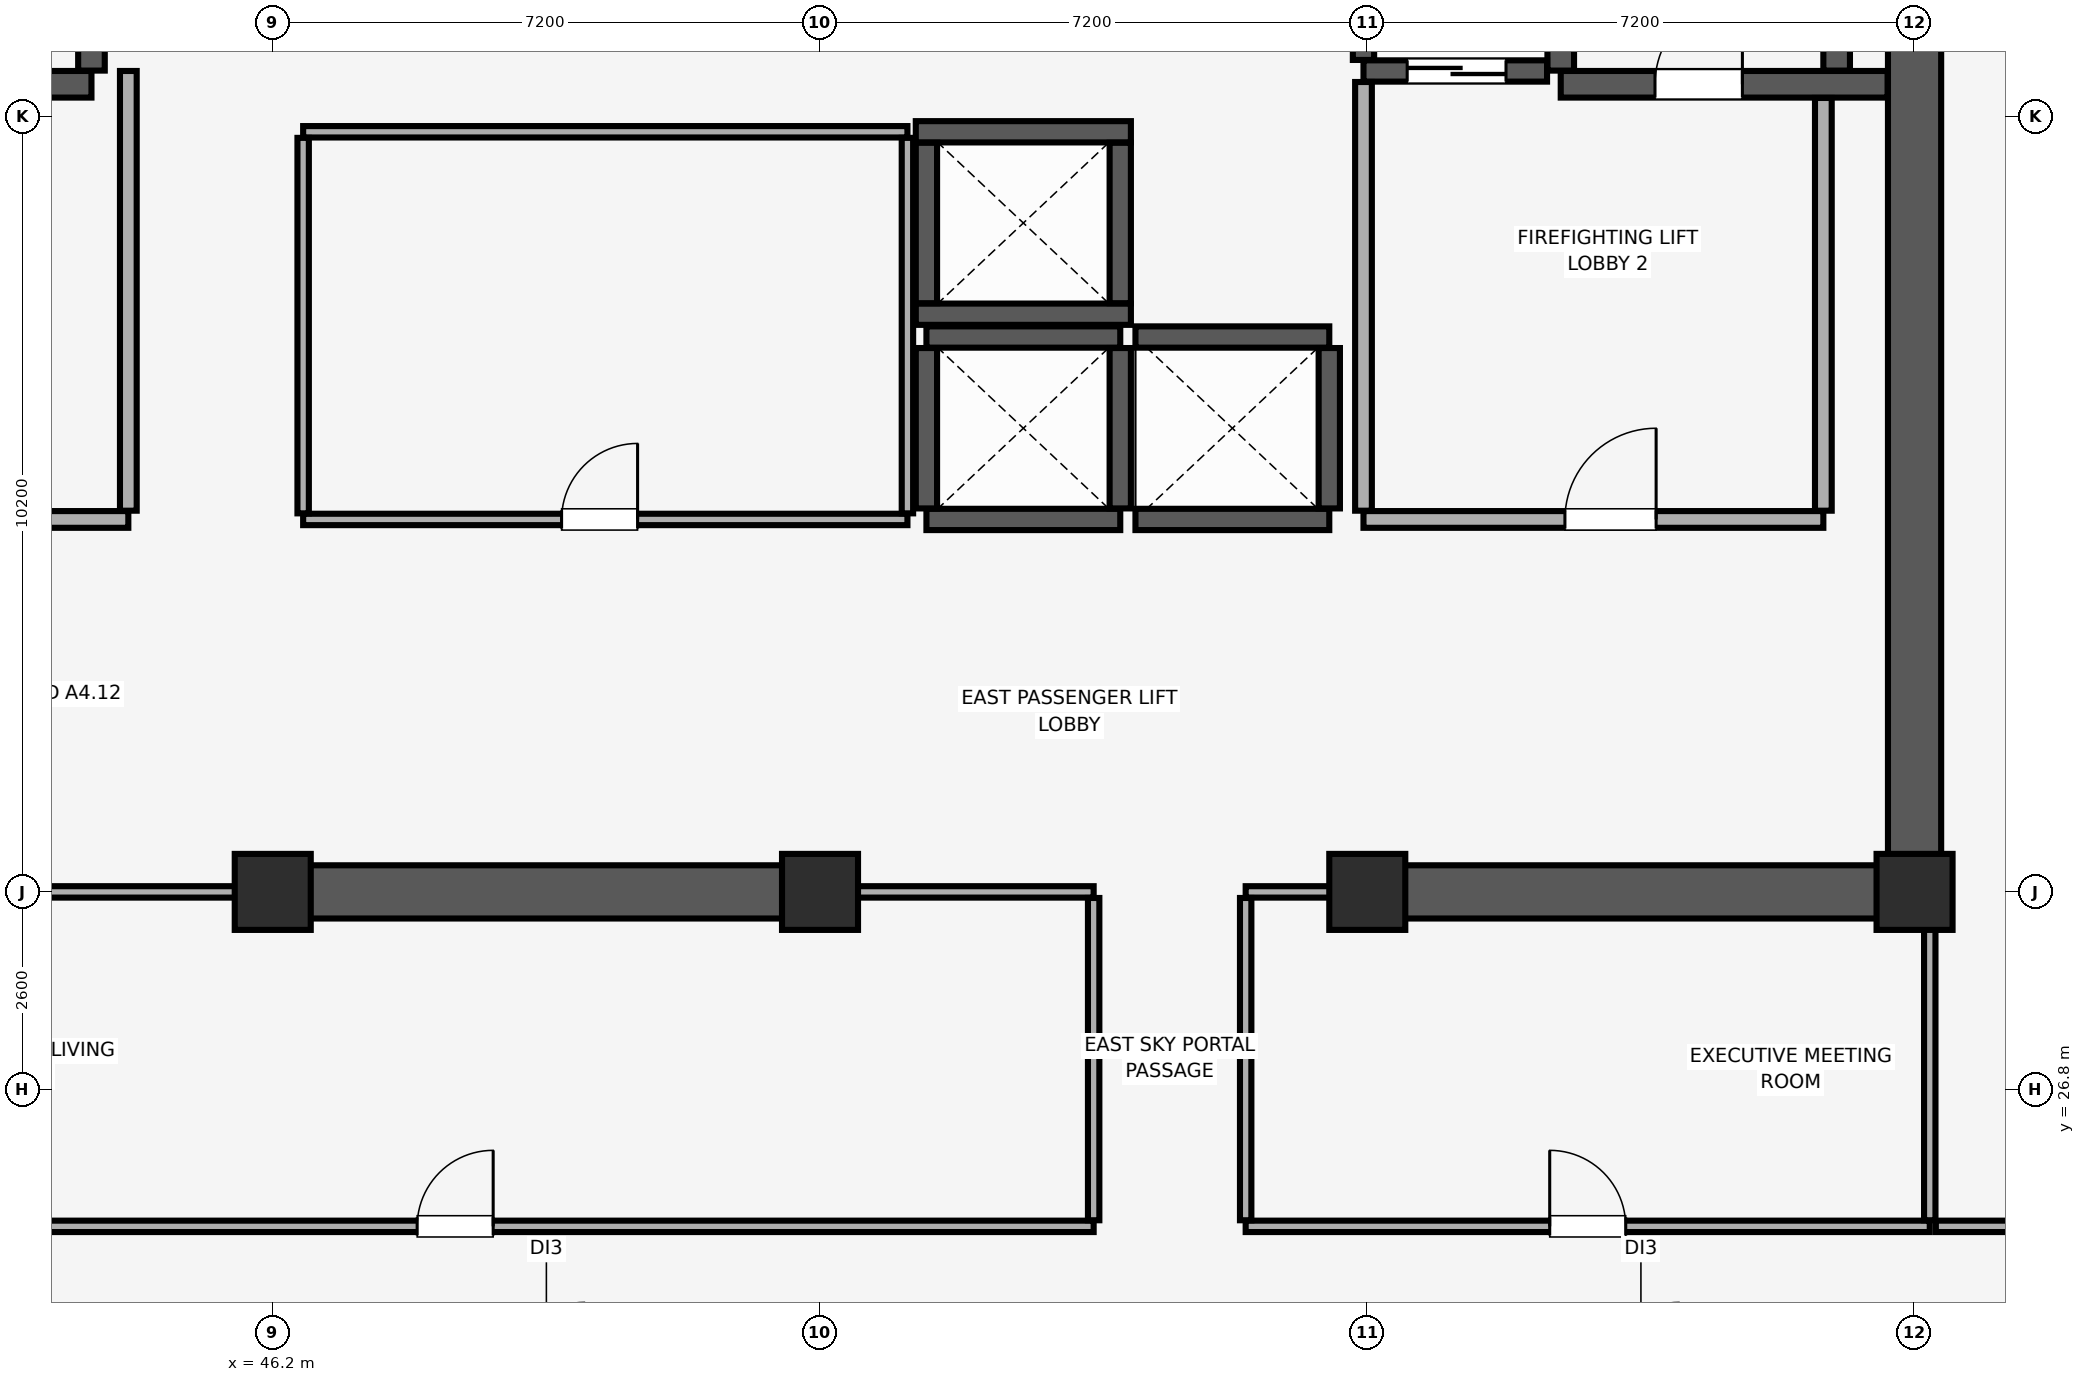
"""IFC4 building model, lengths in metres.
Left out: names, types, materials, properties, quantities, classifications, styles, units other than length and angle.
Written with IfcOpenShell. Run it as: python <this file> out.ifc"""

import sys

from ifc_helpers import new_model, si_unit, direction, frame, frame_2d, origin, origin_2d, place, context, subcontext, project, spatial, rectangle, extrude, element, fill, save


model = new_model("IFC4")
c1 = context("Model", 3, precision=1e-05, world=origin(), true_north=direction((0.0, 1.0)))
c2 = subcontext(c1, "Body", "Model", "MODEL_VIEW")
j1 = project(units=[si_unit("LENGTHUNIT", "METRE"), si_unit("PLANEANGLEUNIT", "RADIAN")], contexts=[c1])
p1 = place(None, origin())
s1 = spatial("IfcSite", under=j1, at=p1, CompositionType="ELEMENT")
p2 = place(p1, origin())
s2 = spatial("IfcBuilding", under=s1, at=p2, CompositionType="ELEMENT")
p3 = place(p2, frame((0.0, 0.0, 276.55)))
s3 = spatial("IfcBuildingStorey", under=s2, at=p3, CompositionType="ELEMENT", Elevation=276.55)
for number, where, z_axis, x_axis in (
    (1, (46.2, 29.4, 0.0), (0.0, 0.0, 1.0), (1.0, 0.0, 0.0)),
    (2, (53.4, 29.4, 0.0), (0.0, 0.0, 1.0), (1.0, 0.0, 0.0)),
    (3, (60.6, 29.4, 0.0), (0.0, 0.0, 1.0), (1.0, 0.0, 0.0)),
    (4, (67.8, 29.4, 0.0), (0.0, 0.0, 1.0), (1.0, 0.0, 0.0)),
):
    element("IfcColumn", number, at=place(p3, frame(where, z_axis=z_axis, x_axis=x_axis)), inside=s3, PredefinedType="COLUMN", context=c2, shape_type="SweptSolid", body=[
        extrude(rectangle(XDim=1.0, YDim=1.0, at=origin_2d()), origin(), (0.0, 0.0, 1.0), 3.6),
    ])
p4 = place(p3, frame((67.8, 29.4, 0.0), z_axis=(0.0, 0.0, 1.0), x_axis=(0.0, 1.0, 0.0)))
e5 = element("IfcWall", 5, at=p4, inside=s3, PredefinedType="SHEAR", context=c2, shape_type="SweptSolid", body=[
    extrude(rectangle(XDim=19.2, YDim=0.7, at=frame_2d((9.6, 0.0))), origin(), (0.0, 0.0, 1.0), 3.6),
])
p5 = place(p3, frame((46.0, 29.4, 0.0), z_axis=(0.0, 0.0, 1.0), x_axis=(1.0, 0.0, 0.0)))
e6 = element("IfcWall", 6, at=p5, inside=s3, PredefinedType="SHEAR", context=c2, shape_type="SweptSolid", body=[
    extrude(rectangle(XDim=7.6, YDim=0.7, at=frame_2d((3.8, 0.0))), origin(), (0.0, 0.0, 1.0), 3.6),
])
p6 = place(p3, frame((60.4, 29.4, 0.0), z_axis=(0.0, 0.0, 1.0), x_axis=(1.0, 0.0, 0.0)))
e7 = element("IfcWall", 7, at=p6, inside=s3, PredefinedType="SHEAR", context=c2, shape_type="SweptSolid", body=[
    extrude(rectangle(XDim=7.045, YDim=0.7, at=frame_2d((3.522, 0.0))), origin(), (0.0, 0.0, 1.0), 3.6),
])
p7 = place(p3, frame((40.185, 40.025, 0.0), z_axis=(0.0, 0.0, 1.0), x_axis=(1.0, 0.0, 0.0)))
e8 = element("IfcWall", 8, at=p7, inside=s3, PredefinedType="SHEAR", context=c2, shape_type="SweptSolid", body=[
    extrude(rectangle(XDim=3.63, YDim=0.35, at=frame_2d((1.815, 0.0))), origin(), (0.0, 0.0, 1.0), 3.6),
])
p8 = place(p7, frame((1.24, 0.0, 0.0)))
e9 = element("IfcOpeningElement", 9, at=p8, cuts=e8, PredefinedType="OPENING", context=c2, shape_type="SweptSolid", body=[
    extrude(rectangle(XDim=1.15, YDim=2.15, at=frame_2d((0.575, 1.075))), frame((0.0, 0.185, 0.0), z_axis=(0.0, -1.0, 0.0), x_axis=(1.0, 0.0, 0.0)), (0.0, 0.0, 1.0), 0.37),
])
p9 = place(p3, frame((43.815, 40.205, 0.0), z_axis=(0.0, 0.0, 1.0), x_axis=(0.0, 1.0, 0.0)))
e10 = element("IfcWall", 10, at=p9, inside=s3, PredefinedType="SHEAR", context=c2, shape_type="SweptSolid", body=[
    extrude(rectangle(XDim=8.09, YDim=0.35, at=frame_2d((4.045, 0.0))), origin(), (0.0, 0.0, 1.0), 3.6),
])
p10 = place(p3, frame((63.145, 40.025, 0.0), z_axis=(0.0, 0.0, 1.0), x_axis=(1.0, 0.0, 0.0)))
e11 = element("IfcWall", 11, at=p10, inside=s3, PredefinedType="SHEAR", context=c2, shape_type="SweptSolid", body=[
    extrude(rectangle(XDim=4.3, YDim=0.35, at=frame_2d((2.15, 0.0))), origin(), (0.0, 0.0, 1.0), 3.6),
])
p11 = place(p10, frame((1.24, 0.0, 0.0)))
e12 = element("IfcOpeningElement", 12, at=p11, cuts=e11, PredefinedType="OPENING", context=c2, shape_type="SweptSolid", body=[
    extrude(rectangle(XDim=1.15, YDim=2.15, at=frame_2d((0.575, 1.075))), frame((0.0, 0.185, 0.0), z_axis=(0.0, -1.0, 0.0), x_axis=(1.0, 0.0, 0.0)), (0.0, 0.0, 1.0), 0.37),
])
for number, where, z_axis, x_axis in (
    (13, (63.145, 40.205, 0.0), (0.0, 0.0, 1.0), (0.0, 1.0, 0.0)),
    (14, (66.775, 40.205, 0.0), (0.0, 0.0, 1.0), (0.0, 1.0, 0.0)),
):
    element("IfcWall", number, at=place(p3, frame(where, z_axis=z_axis, x_axis=x_axis)), inside=s3, PredefinedType="SHEAR", context=c2, shape_type="SweptSolid", body=[
        extrude(rectangle(XDim=8.09, YDim=0.35, at=frame_2d((4.045, 0.0))), origin(), (0.0, 0.0, 1.0), 3.6),
    ])
for number, where, z_axis, x_axis in (
    (15, (54.8, 34.3, 0.0), (0.0, 0.0, 1.0), (1.0, 0.0, 0.0)),
    (16, (54.8, 36.7, 0.0), (0.0, 0.0, 1.0), (1.0, 0.0, 0.0)),
):
    element("IfcWall", number, at=place(p3, frame(where, z_axis=z_axis, x_axis=x_axis)), inside=s3, PredefinedType="SHEAR", context=c2, shape_type="SweptSolid", body=[
        extrude(rectangle(XDim=2.55, YDim=0.28, at=frame_2d((1.275, 0.0))), origin(), (0.0, 0.0, 1.0), 3.6),
    ])
for number, where, z_axis, x_axis in (
    (17, (54.8, 34.445, 0.0), (0.0, 0.0, 1.0), (0.0, 1.0, 0.0)),
    (18, (57.35, 34.445, 0.0), (0.0, 0.0, 1.0), (0.0, 1.0, 0.0)),
):
    element("IfcWall", number, at=place(p3, frame(where, z_axis=z_axis, x_axis=x_axis)), inside=s3, PredefinedType="SHEAR", context=c2, shape_type="SweptSolid", body=[
        extrude(rectangle(XDim=2.11, YDim=0.28, at=frame_2d((1.055, 0.0))), origin(), (0.0, 0.0, 1.0), 3.6),
    ])
for number, where, z_axis, x_axis in (
    (19, (57.55, 34.3, 0.0), (0.0, 0.0, 1.0), (1.0, 0.0, 0.0)),
    (20, (57.55, 36.7, 0.0), (0.0, 0.0, 1.0), (1.0, 0.0, 0.0)),
):
    element("IfcWall", number, at=place(p3, frame(where, z_axis=z_axis, x_axis=x_axis)), inside=s3, PredefinedType="SHEAR", context=c2, shape_type="SweptSolid", body=[
        extrude(rectangle(XDim=2.55, YDim=0.28, at=frame_2d((1.275, 0.0))), origin(), (0.0, 0.0, 1.0), 3.6),
    ])
p12 = place(p3, frame((60.1, 34.445, 0.0), z_axis=(0.0, 0.0, 1.0), x_axis=(0.0, 1.0, 0.0)))
e21 = element("IfcWall", 21, at=p12, inside=s3, PredefinedType="SHEAR", context=c2, shape_type="SweptSolid", body=[
    extrude(rectangle(XDim=2.11, YDim=0.28, at=frame_2d((1.055, 0.0))), origin(), (0.0, 0.0, 1.0), 3.6),
])
for number, where, z_axis, x_axis in (
    (22, (54.66, 37.0, 0.0), (0.0, 0.0, 1.0), (1.0, 0.0, 0.0)),
    (23, (54.66, 39.4, 0.0), (0.0, 0.0, 1.0), (1.0, 0.0, 0.0)),
):
    element("IfcWall", number, at=place(p3, frame(where, z_axis=z_axis, x_axis=x_axis)), inside=s3, PredefinedType="SHEAR", context=c2, shape_type="SweptSolid", body=[
        extrude(rectangle(XDim=2.83, YDim=0.28, at=frame_2d((1.415, 0.0))), origin(), (0.0, 0.0, 1.0), 3.6),
    ])
for number, where, z_axis, x_axis in (
    (24, (54.8, 37.145, 0.0), (0.0, 0.0, 1.0), (0.0, 1.0, 0.0)),
    (25, (57.35, 37.145, 0.0), (0.0, 0.0, 1.0), (0.0, 1.0, 0.0)),
):
    element("IfcWall", number, at=place(p3, frame(where, z_axis=z_axis, x_axis=x_axis)), inside=s3, PredefinedType="SHEAR", context=c2, shape_type="SweptSolid", body=[
        extrude(rectangle(XDim=2.11, YDim=0.28, at=frame_2d((1.055, 0.0))), origin(), (0.0, 0.0, 1.0), 3.6),
    ])
p13 = place(p3, frame((60.55, 40.2, 0.0), z_axis=(0.0, 0.0, 1.0), x_axis=(1.0, 0.0, 0.0)))
e26 = element("IfcWall", 26, at=p13, inside=s3, PredefinedType="SHEAR", context=c2, shape_type="SweptSolid", body=[
    extrude(rectangle(XDim=2.415, YDim=0.28, at=frame_2d((1.208, 0.0))), origin(), (0.0, 0.0, 1.0), 3.6),
])
p14 = place(p13, frame((0.575, 0.0, 0.0)))
e27 = element("IfcOpeningElement", 27, at=p14, cuts=e26, PredefinedType="OPENING", context=c2, shape_type="SweptSolid", body=[
    extrude(rectangle(XDim=1.3, YDim=2.3, at=frame_2d((0.65, 1.15))), frame((0.0, 0.15, 0.0), z_axis=(0.0, -1.0, 0.0), x_axis=(1.0, 0.0, 0.0)), (0.0, 0.0, 1.0), 0.3),
])
p15 = place(p3, frame((60.55, 40.345, 0.0), z_axis=(0.0, 0.0, 1.0), x_axis=(0.0, 1.0, 0.0)))
e28 = element("IfcWall", 28, at=p15, inside=s3, PredefinedType="SHEAR", context=c2, shape_type="SweptSolid", body=[
    extrude(rectangle(XDim=2.81, YDim=0.28, at=frame_2d((1.405, 0.0))), origin(), (0.0, 0.0, 1.0), 3.6),
])
p16 = place(p3, frame((60.55, 34.3, 0.0), z_axis=(0.0, 0.0, 1.0), x_axis=(1.0, 0.0, 0.0)))
e29 = element("IfcWall", 29, at=p16, inside=s3, PredefinedType="PARTITIONING", context=c2, shape_type="SweptSolid", body=[
    extrude(rectangle(XDim=6.05, YDim=0.22, at=frame_2d((3.025, 0.0))), origin(), (0.0, 0.0, 1.0), 3.6),
])
p17 = place(p16, frame((2.65, 0.0, 0.0)))
e30 = element("IfcOpeningElement", 30, at=p17, cuts=e29, PredefinedType="OPENING", context=c2, shape_type="SweptSolid", body=[
    extrude(rectangle(XDim=1.2, YDim=2.15, at=frame_2d((0.6, 1.075))), frame((0.0, 0.12, 0.0), z_axis=(0.0, -1.0, 0.0), x_axis=(1.0, 0.0, 0.0)), (0.0, 0.0, 1.0), 0.24),
])
p18 = place(p3, frame((60.55, 34.415, 0.0), z_axis=(0.0, 0.0, 1.0), x_axis=(0.0, 1.0, 0.0)))
e31 = element("IfcWall", 31, at=p18, inside=s3, PredefinedType="PARTITIONING", context=c2, shape_type="SweptSolid", body=[
    extrude(rectangle(XDim=5.64, YDim=0.22, at=frame_2d((2.82, 0.0))), origin(), (0.0, 0.0, 1.0), 3.6),
])
p19 = place(p3, frame((66.6, 34.415, 0.0), z_axis=(0.0, 0.0, 1.0), x_axis=(0.0, 1.0, 0.0)))
e32 = element("IfcWall", 32, at=p19, inside=s3, PredefinedType="PARTITIONING", context=c2, shape_type="SweptSolid", body=[
    extrude(rectangle(XDim=5.43, YDim=0.22, at=frame_2d((2.715, 0.0))), origin(), (0.0, 0.0, 1.0), 3.6),
])
p20 = place(p3, frame((39.7, 34.3, 0.0), z_axis=(0.0, 0.0, 1.0), x_axis=(1.0, 0.0, 0.0)))
e33 = element("IfcWall", 33, at=p20, inside=s3, PredefinedType="PARTITIONING", context=c2, shape_type="SweptSolid", body=[
    extrude(rectangle(XDim=4.6, YDim=0.22, at=frame_2d((2.3, 0.0))), origin(), (0.0, 0.0, 1.0), 3.6),
])
p21 = place(p20, frame((1.7, 0.0, 0.0)))
e34 = element("IfcOpeningElement", 34, at=p21, cuts=e33, PredefinedType="OPENING", context=c2, shape_type="SweptSolid", body=[
    extrude(rectangle(XDim=1.2, YDim=2.15, at=frame_2d((0.6, 1.075))), frame((0.0, 0.12, 0.0), z_axis=(0.0, -1.0, 0.0), x_axis=(1.0, 0.0, 0.0)), (0.0, 0.0, 1.0), 0.24),
])
p22 = place(p3, frame((44.3, 34.415, 0.0), z_axis=(0.0, 0.0, 1.0), x_axis=(0.0, 1.0, 0.0)))
e35 = element("IfcWall", 35, at=p22, inside=s3, PredefinedType="PARTITIONING", context=c2, shape_type="SweptSolid", body=[
    extrude(rectangle(XDim=5.785, YDim=0.22, at=frame_2d((2.893, 0.0))), origin(), (0.0, 0.0, 1.0), 3.6),
])
p23 = place(p3, frame((46.6, 34.3, 0.0), z_axis=(0.0, 0.0, 1.0), x_axis=(1.0, 0.0, 0.0)))
e36 = element("IfcWall", 36, at=p23, inside=s3, PredefinedType="PARTITIONING", context=c2, shape_type="SweptSolid", body=[
    extrude(rectangle(XDim=7.95, YDim=0.15, at=frame_2d((3.975, 0.0))), origin(), (0.0, 0.0, 1.0), 3.6),
])
p24 = place(p23, frame((3.4, 0.0, 0.0)))
e37 = element("IfcOpeningElement", 37, at=p24, cuts=e36, PredefinedType="OPENING", context=c2, shape_type="SweptSolid", body=[
    extrude(rectangle(XDim=1.0, YDim=2.15, at=frame_2d((0.5, 1.075))), frame((0.0, 0.085, 0.0), z_axis=(0.0, -1.0, 0.0), x_axis=(1.0, 0.0, 0.0)), (0.0, 0.0, 1.0), 0.17),
])
p25 = place(p3, frame((46.6, 39.4, 0.0), z_axis=(0.0, 0.0, 1.0), x_axis=(1.0, 0.0, 0.0)))
e38 = element("IfcWall", 38, at=p25, inside=s3, PredefinedType="PARTITIONING", context=c2, shape_type="SweptSolid", body=[
    extrude(rectangle(XDim=7.95, YDim=0.15, at=frame_2d((3.975, 0.0))), origin(), (0.0, 0.0, 1.0), 3.6),
])
for number, where, z_axis, x_axis in (
    (39, (46.6, 34.38, 0.0), (0.0, 0.0, 1.0), (0.0, 1.0, 0.0)),
    (40, (54.55, 34.38, 0.0), (0.0, 0.0, 1.0), (0.0, 1.0, 0.0)),
):
    element("IfcWall", number, at=place(p3, frame(where, z_axis=z_axis, x_axis=x_axis)), inside=s3, PredefinedType="PARTITIONING", context=c2, shape_type="SweptSolid", body=[
        extrude(rectangle(XDim=4.94, YDim=0.15, at=frame_2d((2.47, 0.0))), origin(), (0.0, 0.0, 1.0), 3.6),
    ])
p26 = place(p3, frame((40.28, 25.0, 0.0), z_axis=(0.0, 0.0, 1.0), x_axis=(1.0, 0.0, 0.0)))
e41 = element("IfcWall", 41, at=p26, inside=s3, PredefinedType="PARTITIONING", context=c2, shape_type="SweptSolid", body=[
    extrude(rectangle(XDim=16.72, YDim=0.15, at=frame_2d((8.36, 0.0))), origin(), (0.0, 0.0, 1.0), 3.6),
])
p27 = place(p26, frame((7.82, 0.0, 0.0)))
e42 = element("IfcOpeningElement", 42, at=p27, cuts=e41, PredefinedType="OPENING", context=c2, shape_type="SweptSolid", body=[
    extrude(rectangle(XDim=1.0, YDim=2.15, at=frame_2d((0.5, 1.075))), frame((0.0, 0.085, 0.0), z_axis=(0.0, -1.0, 0.0), x_axis=(1.0, 0.0, 0.0)), (0.0, 0.0, 1.0), 0.17),
])
p28 = place(p3, frame((40.28, 29.4, 0.0), z_axis=(0.0, 0.0, 1.0), x_axis=(1.0, 0.0, 0.0)))
e43 = element("IfcWall", 43, at=p28, inside=s3, PredefinedType="PARTITIONING", context=c2, shape_type="SweptSolid", body=[
    extrude(rectangle(XDim=5.71, YDim=0.15, at=frame_2d((2.855, 0.0))), origin(), (0.0, 0.0, 1.0), 2.5),
])
p29 = place(p3, frame((53.61, 29.4, 0.0), z_axis=(0.0, 0.0, 1.0), x_axis=(1.0, 0.0, 0.0)))
e44 = element("IfcWall", 44, at=p29, inside=s3, PredefinedType="PARTITIONING", context=c2, shape_type="SweptSolid", body=[
    extrude(rectangle(XDim=3.39, YDim=0.15, at=frame_2d((1.695, 0.0))), origin(), (0.0, 0.0, 1.0), 2.5),
])
p30 = place(p3, frame((57.0, 25.08, 0.0), z_axis=(0.0, 0.0, 1.0), x_axis=(0.0, 1.0, 0.0)))
e45 = element("IfcWall", 45, at=p30, inside=s3, PredefinedType="PARTITIONING", context=c2, shape_type="SweptSolid", body=[
    extrude(rectangle(XDim=4.24, YDim=0.15, at=frame_2d((2.12, 0.0))), origin(), (0.0, 0.0, 1.0), 3.1),
])
p31 = place(p3, frame((59.0, 25.0, 0.0), z_axis=(0.0, 0.0, 1.0), x_axis=(1.0, 0.0, 0.0)))
e46 = element("IfcWall", 46, at=p31, inside=s3, PredefinedType="PARTITIONING", context=c2, shape_type="SweptSolid", body=[
    extrude(rectangle(XDim=9.0, YDim=0.15, at=frame_2d((4.5, 0.0))), origin(), (0.0, 0.0, 1.0), 3.6),
])
p32 = place(p31, frame((4.0, 0.0, 0.0)))
e47 = element("IfcOpeningElement", 47, at=p32, cuts=e46, PredefinedType="OPENING", context=c2, shape_type="SweptSolid", body=[
    extrude(rectangle(XDim=1.0, YDim=2.15, at=frame_2d((0.5, 1.075))), frame((0.0, 0.085, 0.0), z_axis=(0.0, -1.0, 0.0), x_axis=(1.0, 0.0, 0.0)), (0.0, 0.0, 1.0), 0.17),
])
p33 = place(p3, frame((59.0, 29.4, 0.0), z_axis=(0.0, 0.0, 1.0), x_axis=(1.0, 0.0, 0.0)))
e48 = element("IfcWall", 48, at=p33, inside=s3, PredefinedType="PARTITIONING", context=c2, shape_type="SweptSolid", body=[
    extrude(rectangle(XDim=1.39, YDim=0.15, at=frame_2d((0.695, 0.0))), origin(), (0.0, 0.0, 1.0), 2.5),
])
p34 = place(p3, frame((59.0, 25.08, 0.0), z_axis=(0.0, 0.0, 1.0), x_axis=(0.0, 1.0, 0.0)))
e49 = element("IfcWall", 49, at=p34, inside=s3, PredefinedType="PARTITIONING", context=c2, shape_type="SweptSolid", body=[
    extrude(rectangle(XDim=4.24, YDim=0.15, at=frame_2d((2.12, 0.0))), origin(), (0.0, 0.0, 1.0), 3.6),
])
p35 = place(p3, frame((68.0, 25.08, 0.0), z_axis=(0.0, 0.0, 1.0), x_axis=(0.0, 1.0, 0.0)))
e50 = element("IfcWall", 50, at=p35, inside=s3, PredefinedType="PARTITIONING", context=c2, shape_type="SweptSolid", body=[
    extrude(rectangle(XDim=4.31, YDim=0.15, at=frame_2d((2.155, 0.0))), origin(), (0.0, 0.0, 1.0), 3.1),
])
p36 = place(p3, frame((68.08, 25.0, 0.0), z_axis=(0.0, 0.0, 1.0), x_axis=(1.0, 0.0, 0.0)))
e51 = element("IfcWall", 51, at=p36, inside=s3, PredefinedType="PARTITIONING", context=c2, shape_type="SweptSolid", body=[
    extrude(rectangle(XDim=9.77, YDim=0.15, at=frame_2d((4.885, 0.0))), origin(), (0.0, 0.0, 1.0), 3.6),
])
p37 = place(p36, frame((2.14, 0.0, 0.0)))
e52 = element("IfcOpeningElement", 52, at=p37, cuts=e51, PredefinedType="OPENING", context=c2, shape_type="SweptSolid", body=[
    extrude(rectangle(XDim=1.5, YDim=2.25, at=frame_2d((0.75, 1.125))), frame((0.0, 0.085, 0.0), z_axis=(0.0, -1.0, 0.0), x_axis=(1.0, 0.0, 0.0)), (0.0, 0.0, 1.0), 0.17),
])
p38 = place(p11, origin())
e53 = element("IfcDoor", 53, at=p38, inside=s3, OperationType="SINGLE_SWING_RIGHT", PredefinedType="DOOR", context=c2, shape_type="SweptSolid", body=[
    extrude(rectangle(XDim=1.15, YDim=2.15, at=frame_2d((0.575, 1.075))), frame((0.0, 0.025, 0.0), z_axis=(0.0, -1.0, 0.0), x_axis=(1.0, 0.0, 0.0)), (0.0, 0.0, 1.0), 0.05),
])
fill(e12, e53)
p39 = place(p14, origin())
e54 = element("IfcDoor", 54, at=p39, inside=s3, OperationType="DOUBLE_DOOR_SLIDING", PredefinedType="DOOR", context=c2, shape_type="SweptSolid", body=[
    extrude(rectangle(XDim=1.3, YDim=2.3, at=frame_2d((0.65, 1.15))), frame((0.0, 0.025, 0.0), z_axis=(0.0, -1.0, 0.0), x_axis=(1.0, 0.0, 0.0)), (0.0, 0.0, 1.0), 0.05),
])
fill(e27, e54)
p40 = place(p17, origin())
e55 = element("IfcDoor", 55, at=p40, inside=s3, OperationType="SINGLE_SWING_RIGHT", PredefinedType="DOOR", context=c2, shape_type="SweptSolid", body=[
    extrude(rectangle(XDim=1.2, YDim=2.15, at=frame_2d((0.6, 1.075))), frame((0.0, 0.025, 0.0), z_axis=(0.0, -1.0, 0.0), x_axis=(1.0, 0.0, 0.0)), (0.0, 0.0, 1.0), 0.05),
])
fill(e30, e55)
p41 = place(p24, origin())
e56 = element("IfcDoor", 56, at=p41, inside=s3, OperationType="SINGLE_SWING_RIGHT", PredefinedType="DOOR", context=c2, shape_type="SweptSolid", body=[
    extrude(rectangle(XDim=1.0, YDim=2.15, at=frame_2d((0.5, 1.075))), frame((0.0, 0.025, 0.0), z_axis=(0.0, -1.0, 0.0), x_axis=(1.0, 0.0, 0.0)), (0.0, 0.0, 1.0), 0.05),
])
fill(e37, e56)
p42 = place(p27, origin())
e57 = element("IfcDoor", 57, at=p42, inside=s3, OperationType="SINGLE_SWING_RIGHT", PredefinedType="DOOR", context=c2, shape_type="SweptSolid", body=[
    extrude(rectangle(XDim=1.0, YDim=2.15, at=frame_2d((0.5, 1.075))), frame((0.0, 0.025, 0.0), z_axis=(0.0, -1.0, 0.0), x_axis=(1.0, 0.0, 0.0)), (0.0, 0.0, 1.0), 0.05),
])
fill(e42, e57)
p43 = place(p32, origin())
e58 = element("IfcDoor", 58, at=p43, inside=s3, OperationType="SINGLE_SWING_LEFT", PredefinedType="DOOR", context=c2, shape_type="SweptSolid", body=[
    extrude(rectangle(XDim=1.0, YDim=2.15, at=frame_2d((0.5, 1.075))), frame((0.0, 0.025, 0.0), z_axis=(0.0, -1.0, 0.0), x_axis=(1.0, 0.0, 0.0)), (0.0, 0.0, 1.0), 0.05),
])
fill(e47, e58)
save(model, sys.argv[1])
